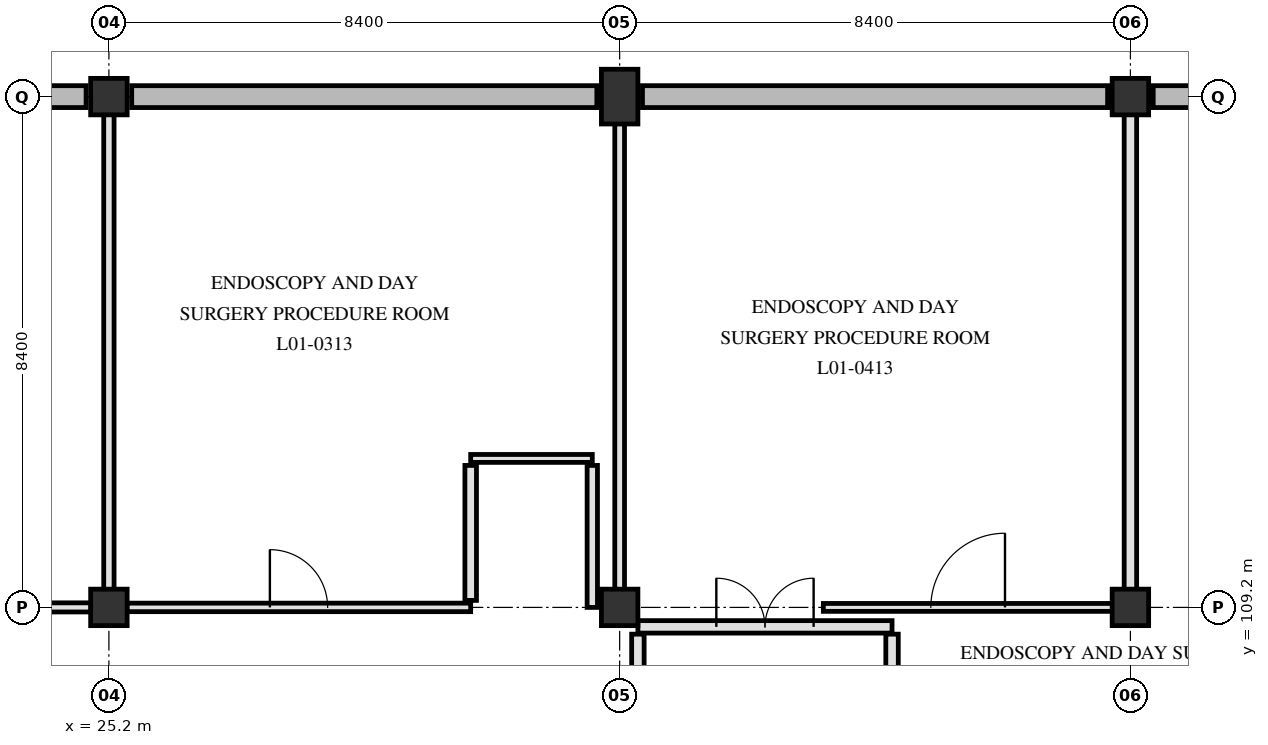
"""IFC4 building model, lengths in metres.
Left out: names, types, materials, properties, quantities, classifications, styles, units other than length and angle.
Written with IfcOpenShell. Run it as: python <this file> out.ifc"""

import sys

from ifc_helpers import new_model, si_unit, direction, frame, frame_2d, origin, origin_2d, place, context, subcontext, project, spatial, rectangle, extrude, element, fill, save


model = new_model("IFC4")
c1 = context("Model", 3, precision=1e-05, world=origin(), true_north=direction((0.0, 1.0)))
c2 = subcontext(c1, "Body", "Model", "MODEL_VIEW")
j1 = project(units=[si_unit("LENGTHUNIT", "METRE"), si_unit("PLANEANGLEUNIT", "RADIAN")], contexts=[c1])
p1 = place(None, origin())
s1 = spatial("IfcSite", under=j1, at=p1, CompositionType="ELEMENT")
p2 = place(p1, origin())
s2 = spatial("IfcBuilding", under=s1, at=p2, CompositionType="ELEMENT")
p3 = place(p2, frame((0.0, 0.0, 4.8)))
s3 = spatial("IfcBuildingStorey", under=s2, at=p3, CompositionType="ELEMENT", Elevation=4.8)
for number, where, z_axis, x_axis in (
    (1, (25.2, 109.2, 0.0), (0.0, 0.0, 1.0), (1.0, 0.0, 0.0)),
    (2, (25.2, 117.6, 0.0), (0.0, 0.0, 1.0), (1.0, 0.0, 0.0)),
    (3, (33.6, 109.2, 0.0), (0.0, 0.0, 1.0), (1.0, 0.0, 0.0)),
):
    element("IfcColumn", number, at=place(p3, frame(where, z_axis=z_axis, x_axis=x_axis)), inside=s3, PredefinedType="COLUMN", context=c2, shape_type="SweptSolid", body=[
        extrude(rectangle(XDim=0.6, YDim=0.6, at=origin_2d()), origin(), (0.0, 0.0, 1.0), 4.5),
    ])
p4 = place(p3, frame((33.6, 117.6, 0.0), z_axis=(0.0, 0.0, 1.0), x_axis=(1.0, 0.0, 0.0)))
e4 = element("IfcColumn", 4, at=p4, inside=s3, PredefinedType="PILASTER", context=c2, shape_type="SweptSolid", body=[
    extrude(rectangle(XDim=0.6, YDim=0.9, at=origin_2d()), origin(), (0.0, 0.0, 1.0), 4.5),
])
for number, where, z_axis, x_axis in (
    (5, (42.0, 109.2, 0.0), (0.0, 0.0, 1.0), (1.0, 0.0, 0.0)),
    (6, (42.0, 117.6, 0.0), (0.0, 0.0, 1.0), (1.0, 0.0, 0.0)),
):
    element("IfcColumn", number, at=place(p3, frame(where, z_axis=z_axis, x_axis=x_axis)), inside=s3, PredefinedType="COLUMN", context=c2, shape_type="SweptSolid", body=[
        extrude(rectangle(XDim=0.6, YDim=0.6, at=origin_2d()), origin(), (0.0, 0.0, 1.0), 4.5),
    ])
p5 = place(p3, frame((17.175, 117.6, 0.0), z_axis=(0.0, 0.0, 1.0), x_axis=(1.0, 0.0, 0.0)))
e7 = element("IfcWall", 7, at=p5, inside=s3, PredefinedType="SOLIDWALL", context=c2, shape_type="SweptSolid", body=[
    extrude(rectangle(XDim=7.65, YDim=0.36, at=frame_2d((3.825, 0.0))), origin(), (0.0, 0.0, 1.0), 4.15),
])
p6 = place(p3, frame((25.575, 117.6, 0.0), z_axis=(0.0, 0.0, 1.0), x_axis=(1.0, 0.0, 0.0)))
e8 = element("IfcWall", 8, at=p6, inside=s3, PredefinedType="SOLIDWALL", context=c2, shape_type="SweptSolid", body=[
    extrude(rectangle(XDim=7.65, YDim=0.36, at=frame_2d((3.825, 0.0))), origin(), (0.0, 0.0, 1.0), 4.15),
])
p7 = place(p3, frame((33.975, 117.6, 0.0), z_axis=(0.0, 0.0, 1.0), x_axis=(1.0, 0.0, 0.0)))
e9 = element("IfcWall", 9, at=p7, inside=s3, PredefinedType="SOLIDWALL", context=c2, shape_type="SweptSolid", body=[
    extrude(rectangle(XDim=7.65, YDim=0.36, at=frame_2d((3.825, 0.0))), origin(), (0.0, 0.0, 1.0), 4.15),
])
p8 = place(p3, frame((42.375, 117.6, 0.0), z_axis=(0.0, 0.0, 1.0), x_axis=(1.0, 0.0, 0.0)))
e10 = element("IfcWall", 10, at=p8, inside=s3, PredefinedType="SOLIDWALL", context=c2, shape_type="SweptSolid", body=[
    extrude(rectangle(XDim=7.6, YDim=0.36, at=frame_2d((3.8, 0.0))), origin(), (0.0, 0.0, 1.0), 4.15),
])
p9 = place(p3, frame((38.08, 104.64, 0.0), z_axis=(0.0, 0.0, 1.0), x_axis=(0.0, 1.0, 0.0)))
e11 = element("IfcWall", 11, at=p9, inside=s3, PredefinedType="PARTITIONING", context=c2, shape_type="SweptSolid", body=[
    extrude(rectangle(XDim=4.12, YDim=0.205, at=frame_2d((2.06, 0.0))), origin(), (0.0, 0.0, 1.0), 4.14),
])
p10 = place(p3, frame((33.9, 104.64, 0.0), z_axis=(0.0, 0.0, 1.0), x_axis=(0.0, 1.0, 0.0)))
e12 = element("IfcWall", 12, at=p10, inside=s3, PredefinedType="PARTITIONING", context=c2, shape_type="SweptSolid", body=[
    extrude(rectangle(XDim=4.12, YDim=0.205, at=frame_2d((2.06, 0.0))), origin(), (0.0, 0.0, 1.0), 3.59),
])
p11 = place(p3, frame((33.9, 108.88, 0.0), z_axis=(0.0, 0.0, 1.0), x_axis=(1.0, 0.0, 0.0)))
e13 = element("IfcWall", 13, at=p11, inside=s3, PredefinedType="PARTITIONING", context=c2, shape_type="SweptSolid", body=[
    extrude(rectangle(XDim=4.18, YDim=0.205, at=frame_2d((2.09, 0.0))), origin(), (0.0, 0.0, 1.0), 3.54),
])
p12 = place(p11, frame((1.29, 0.0, 0.0)))
e14 = element("IfcOpeningElement", 14, at=p12, cuts=e13, PredefinedType="OPENING", context=c2, shape_type="SweptSolid", body=[
    extrude(rectangle(XDim=1.6, YDim=2.25, at=frame_2d((0.8, 1.125))), frame((0.0, 0.113, 0.0), z_axis=(0.0, -1.0, 0.0), x_axis=(1.0, 0.0, 0.0)), (0.0, 0.0, 1.0), 0.225),
])
p13 = place(p3, frame((17.095, 109.2, 0.0), z_axis=(0.0, 0.0, 1.0), x_axis=(1.0, 0.0, 0.0)))
e15 = element("IfcWall", 15, at=p13, inside=s3, PredefinedType="PARTITIONING", context=c2, shape_type="SweptSolid", body=[
    extrude(rectangle(XDim=7.81, YDim=0.15, at=frame_2d((3.905, 0.0))), origin(), (0.0, 0.0, 1.0), 3.54),
])
p14 = place(p13, frame((3.445, 0.0, 0.0)))
e16 = element("IfcOpeningElement", 16, at=p14, cuts=e15, PredefinedType="OPENING", context=c2, shape_type="SweptSolid", body=[
    extrude(rectangle(XDim=0.92, YDim=2.08, at=frame_2d((0.46, 1.04))), frame((0.0, 0.085, 0.0), z_axis=(0.0, -1.0, 0.0), x_axis=(1.0, 0.0, 0.0)), (0.0, 0.0, 1.0), 0.17),
])
p15 = place(p3, frame((25.495, 109.2, 0.0), z_axis=(0.0, 0.0, 1.0), x_axis=(1.0, 0.0, 0.0)))
e17 = element("IfcWall", 17, at=p15, inside=s3, PredefinedType="PARTITIONING", context=c2, shape_type="SweptSolid", body=[
    extrude(rectangle(XDim=5.655, YDim=0.14, at=frame_2d((2.827, 0.0))), origin(), (0.0, 0.0, 1.0), 3.54),
])
p16 = place(p15, frame((2.353, 0.0, 0.0)))
e18 = element("IfcOpeningElement", 18, at=p16, cuts=e17, PredefinedType="OPENING", context=c2, shape_type="SweptSolid", body=[
    extrude(rectangle(XDim=0.95, YDim=2.1, at=frame_2d((0.475, 1.05))), frame((0.0, 0.08, 0.0), z_axis=(0.0, -1.0, 0.0), x_axis=(1.0, 0.0, 0.0)), (0.0, 0.0, 1.0), 0.16),
])
p17 = place(p3, frame((36.95, 109.2, 0.0), z_axis=(0.0, 0.0, 1.0), x_axis=(1.0, 0.0, 0.0)))
e19 = element("IfcWall", 19, at=p17, inside=s3, PredefinedType="PARTITIONING", context=c2, shape_type="SweptSolid", body=[
    extrude(rectangle(XDim=4.755, YDim=0.13, at=frame_2d((2.377, 0.0))), origin(), (0.0, 0.0, 1.0), 3.54),
])
p18 = place(p17, frame((1.768, 0.0, 0.0)))
e20 = element("IfcOpeningElement", 20, at=p18, cuts=e19, PredefinedType="OPENING", context=c2, shape_type="SweptSolid", body=[
    extrude(rectangle(XDim=1.22, YDim=2.18, at=frame_2d((0.61, 1.09))), frame((0.0, 0.075, 0.0), z_axis=(0.0, -1.0, 0.0), x_axis=(1.0, 0.0, 0.0)), (0.0, 0.0, 1.0), 0.15),
])
p19 = place(p3, frame((31.15, 111.65, 0.0), z_axis=(0.0, 0.0, 1.0), x_axis=(1.0, 0.0, 0.0)))
e21 = element("IfcWall", 21, at=p19, inside=s3, PredefinedType="PARTITIONING", context=c2, shape_type="SweptSolid", body=[
    extrude(rectangle(XDim=2.0, YDim=0.13, at=frame_2d((1.0, 0.0))), origin(), (0.0, 0.0, 1.0), 4.14),
])
p20 = place(p3, frame((25.2, 109.495, 0.0), z_axis=(0.0, 0.0, 1.0), x_axis=(0.0, 1.0, 0.0)))
e22 = element("IfcWall", 22, at=p20, inside=s3, PredefinedType="PARTITIONING", context=c2, shape_type="SweptSolid", body=[
    extrude(rectangle(XDim=7.81, YDim=0.17, at=frame_2d((3.905, 0.0))), origin(), (0.0, 0.0, 1.0), 3.59),
])
p21 = place(p3, frame((31.15, 109.315, 0.0), z_axis=(0.0, 0.0, 1.0), x_axis=(0.0, 1.0, 0.0)))
e23 = element("IfcWall", 23, at=p21, inside=s3, PredefinedType="PARTITIONING", context=c2, shape_type="SweptSolid", body=[
    extrude(rectangle(XDim=2.22, YDim=0.19, at=frame_2d((1.11, 0.0))), origin(), (0.0, 0.0, 1.0), 3.54),
])
p22 = place(p3, frame((33.15, 109.2, 0.0), z_axis=(0.0, 0.0, 1.0), x_axis=(0.0, 1.0, 0.0)))
e24 = element("IfcWall", 24, at=p22, inside=s3, PredefinedType="PARTITIONING", context=c2, shape_type="SweptSolid", body=[
    extrude(rectangle(XDim=2.335, YDim=0.17, at=frame_2d((1.167, 0.0))), origin(), (0.0, 0.0, 1.0), 3.54),
])
p23 = place(p3, frame((33.6, 109.495, 0.0), z_axis=(0.0, 0.0, 1.0), x_axis=(0.0, 1.0, 0.0)))
e25 = element("IfcWall", 25, at=p23, inside=s3, PredefinedType="PARTITIONING", context=c2, shape_type="SweptSolid", body=[
    extrude(rectangle(XDim=7.66, YDim=0.16, at=frame_2d((3.83, 0.0))), origin(), (0.0, 0.0, 1.0), 3.59),
])
p24 = place(p3, frame((42.0, 109.495, 0.0), z_axis=(0.0, 0.0, 1.0), x_axis=(0.0, 1.0, 0.0)))
e26 = element("IfcWall", 26, at=p24, inside=s3, PredefinedType="PARTITIONING", context=c2, shape_type="SweptSolid", body=[
    extrude(rectangle(XDim=7.81, YDim=0.205, at=frame_2d((3.905, 0.0))), origin(), (0.0, 0.0, 1.0), 3.59),
])
p25 = place(p12, origin())
e27 = element("IfcDoor", 27, at=p25, inside=s3, OperationType="DOUBLE_SWING_LEFT", PredefinedType="DOOR", context=c2, shape_type="SweptSolid", body=[
    extrude(rectangle(XDim=1.6, YDim=2.25, at=frame_2d((0.8, 1.125))), frame((0.0, 0.025, 0.0), z_axis=(0.0, -1.0, 0.0), x_axis=(1.0, 0.0, 0.0)), (0.0, 0.0, 1.0), 0.05),
])
fill(e14, e27)
p26 = place(p16, origin())
e28 = element("IfcDoor", 28, at=p26, inside=s3, OperationType="SINGLE_SWING_LEFT", PredefinedType="DOOR", context=c2, shape_type="SweptSolid", body=[
    extrude(rectangle(XDim=0.95, YDim=2.1, at=frame_2d((0.475, 1.05))), frame((0.0, 0.025, 0.0), z_axis=(0.0, -1.0, 0.0), x_axis=(1.0, 0.0, 0.0)), (0.0, 0.0, 1.0), 0.05),
])
fill(e18, e28)
p27 = place(p18, origin())
e29 = element("IfcDoor", 29, at=p27, inside=s3, OperationType="SINGLE_SWING_RIGHT", PredefinedType="DOOR", context=c2, shape_type="SweptSolid", body=[
    extrude(rectangle(XDim=1.22, YDim=2.18, at=frame_2d((0.61, 1.09))), frame((0.0, 0.025, 0.0), z_axis=(0.0, -1.0, 0.0), x_axis=(1.0, 0.0, 0.0)), (0.0, 0.0, 1.0), 0.05),
])
fill(e20, e29)
save(model, sys.argv[1])
